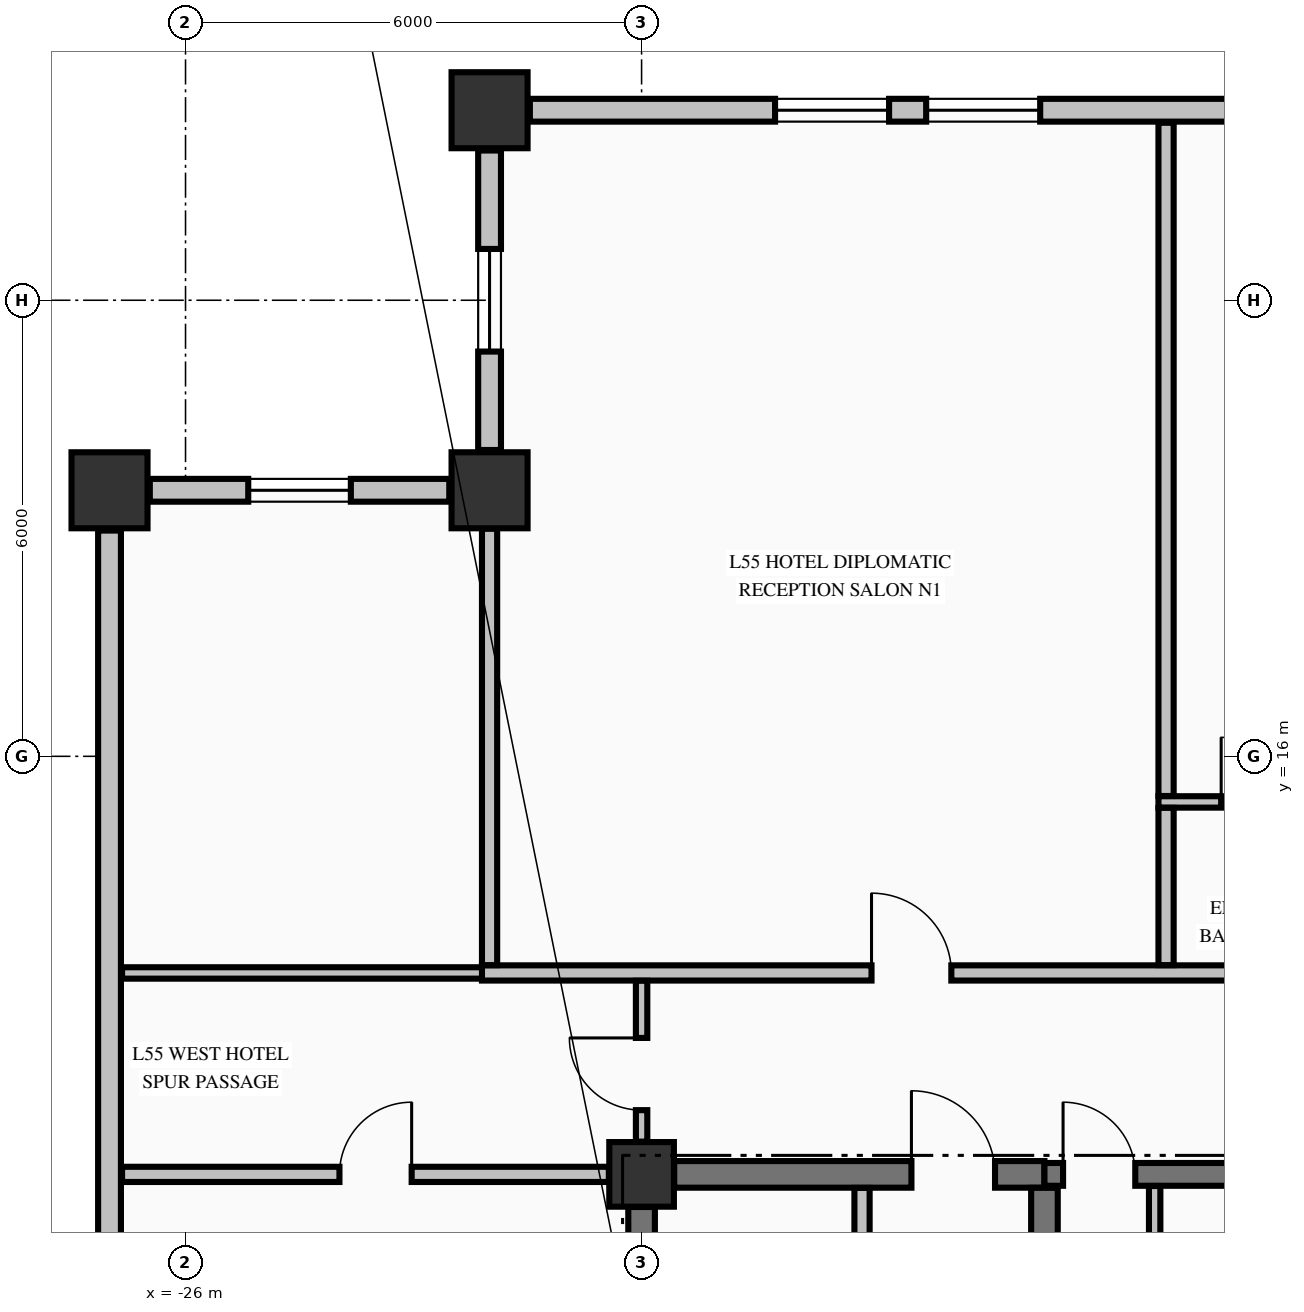
"""IFC4 building model, lengths in metres.
Left out: names, types, materials, properties, quantities, classifications, styles, units other than length and angle.
Written with IfcOpenShell. Run it as: python <this file> out.ifc"""

import sys

from ifc_helpers import new_model, si_unit, direction, frame, frame_2d, origin, origin_2d, place, context, subcontext, project, spatial, rectangle, extrude, element, fill, save


model = new_model("IFC4")
c1 = context("Model", 3, precision=1e-05, world=origin(), true_north=direction((0.0, 1.0)))
c2 = subcontext(c1, "Body", "Model", "MODEL_VIEW")
j1 = project(units=[si_unit("LENGTHUNIT", "METRE"), si_unit("PLANEANGLEUNIT", "RADIAN")], contexts=[c1])
p1 = place(None, origin())
s1 = spatial("IfcSite", under=j1, at=p1, CompositionType="ELEMENT")
p2 = place(p1, origin())
s2 = spatial("IfcBuilding", under=s1, at=p2, CompositionType="ELEMENT")
p3 = place(p2, frame((0.0, 0.0, 211.86)))
s3 = spatial("IfcBuildingStorey", under=s2, at=p3, CompositionType="ELEMENT", Elevation=211.86)
for number, where, z_axis, x_axis in (
    (1, (-22.0, 24.5, -0.325), (0.0, 0.0, 1.0), (1.0, 0.0, 0.0)),
    (2, (-27.0, 19.5, -0.325), (0.0, 0.0, 1.0), (1.0, 0.0, 0.0)),
    (3, (-22.0, 19.5, -0.325), (0.0, 0.0, 1.0), (1.0, 0.0, 0.0)),
):
    element("IfcColumn", number, at=place(p3, frame(where, z_axis=z_axis, x_axis=x_axis)), inside=s3, PredefinedType="COLUMN", context=c2, shape_type="SweptSolid", body=[
        extrude(rectangle(XDim=1.0, YDim=1.0, at=origin_2d()), origin(), (0.0, 0.0, 1.0), 3.475),
    ])
p4 = place(p3, frame((-20.0, 10.5, -0.325), z_axis=(0.0, 0.0, 1.0), x_axis=(1.0, 0.0, 0.0)))
e4 = element("IfcColumn", 4, at=p4, inside=s3, PredefinedType="COLUMN", context=c2, shape_type="SweptSolid", body=[
    extrude(rectangle(XDim=0.85, YDim=0.85, at=origin_2d()), origin(), (0.0, 0.0, 1.0), 3.475),
])
p5 = place(p3, frame((-22.0, 23.97, 0.0), z_axis=(0.0, 0.0, 1.0), x_axis=(0.0, -1.0, 0.0)))
e5 = element("IfcWall", 5, at=p5, inside=s3, PredefinedType="STANDARD", context=c2, shape_type="SweptSolid", body=[
    extrude(rectangle(XDim=3.94, YDim=0.3, at=frame_2d((1.97, 0.0))), origin(), (0.0, 0.0, 1.0), 2.542),
])
p6 = place(p5, frame((1.295, 0.0, 0.68)))
e6 = element("IfcOpeningElement", 6, at=p6, cuts=e5, PredefinedType="OPENING", context=c2, shape_type="SweptSolid", body=[
    extrude(rectangle(XDim=1.35, YDim=1.42, at=frame_2d((0.675, 0.71))), frame((0.0, 0.16, 0.0), z_axis=(0.0, -1.0, 0.0), x_axis=(1.0, 0.0, 0.0)), (0.0, 0.0, 1.0), 0.32),
])
p7 = place(p3, frame((-22.53, 19.5, 0.0), z_axis=(0.0, 0.0, 1.0), x_axis=(-1.0, 0.0, 0.0)))
e7 = element("IfcWall", 7, at=p7, inside=s3, PredefinedType="STANDARD", context=c2, shape_type="SweptSolid", body=[
    extrude(rectangle(XDim=3.94, YDim=0.3, at=frame_2d((1.97, 0.0))), origin(), (0.0, 0.0, 1.0), 2.542),
])
p8 = place(p7, frame((1.295, 0.0, 0.68)))
e8 = element("IfcOpeningElement", 8, at=p8, cuts=e7, PredefinedType="OPENING", context=c2, shape_type="SweptSolid", body=[
    extrude(rectangle(XDim=1.35, YDim=1.42, at=frame_2d((0.675, 0.71))), frame((0.0, 0.16, 0.0), z_axis=(0.0, -1.0, 0.0), x_axis=(1.0, 0.0, 0.0)), (0.0, 0.0, 1.0), 0.32),
])
p9 = place(p3, frame((-11.53, 24.5, 0.0), z_axis=(0.0, 0.0, 1.0), x_axis=(-1.0, 0.0, 0.0)))
e9 = element("IfcWall", 9, at=p9, inside=s3, PredefinedType="STANDARD", context=c2, shape_type="SweptSolid", body=[
    extrude(rectangle(XDim=9.94, YDim=0.3, at=frame_2d((4.97, 0.0))), origin(), (0.0, 0.0, 1.0), 2.542),
])
p10 = place(p9, frame((3.226, 0.0, 0.72)))
e10 = element("IfcOpeningElement", 10, at=p10, cuts=e9, PredefinedType="OPENING", context=c2, shape_type="SweptSolid", body=[
    extrude(rectangle(XDim=1.5, YDim=1.6, at=frame_2d((0.75, 0.8))), frame((0.0, 0.16, 0.0), z_axis=(0.0, -1.0, 0.0), x_axis=(1.0, 0.0, 0.0)), (0.0, 0.0, 1.0), 0.32),
])
p11 = place(p9, frame((5.214, 0.0, 0.72)))
e11 = element("IfcOpeningElement", 11, at=p11, cuts=e9, PredefinedType="OPENING", context=c2, shape_type="SweptSolid", body=[
    extrude(rectangle(XDim=1.5, YDim=1.6, at=frame_2d((0.75, 0.8))), frame((0.0, 0.16, 0.0), z_axis=(0.0, -1.0, 0.0), x_axis=(1.0, 0.0, 0.0)), (0.0, 0.0, 1.0), 0.32),
])
p12 = place(p3, frame((-27.0, 18.97, 0.0), z_axis=(0.0, 0.0, 1.0), x_axis=(0.0, -1.0, 0.0)))
e12 = element("IfcWall", 12, at=p12, inside=s3, PredefinedType="STANDARD", context=c2, shape_type="SweptSolid", body=[
    extrude(rectangle(XDim=9.44, YDim=0.3, at=frame_2d((4.72, 0.0))), origin(), (0.0, 0.0, 1.0), 2.542),
])
p13 = place(p3, frame((-19.571, 10.5, 0.0), z_axis=(0.0, 0.0, 1.0), x_axis=(1.0, 0.0, 0.0)))
e13 = element("IfcWall", 13, at=p13, inside=s3, PredefinedType="SHEAR", context=c2, shape_type="SweptSolid", body=[
    extrude(rectangle(XDim=4.871, YDim=0.35, at=frame_2d((2.436, 0.0))), origin(), (0.0, 0.0, 1.0), 3.15),
])
p14 = place(p13, frame((3.121, 0.0, 0.0)))
e14 = element("IfcOpeningElement", 14, at=p14, cuts=e13, PredefinedType="OPENING", context=c2, shape_type="SweptSolid", body=[
    extrude(rectangle(XDim=1.1, YDim=2.15, at=frame_2d((0.55, 1.075))), frame((0.0, 0.185, 0.0), z_axis=(0.0, -1.0, 0.0), x_axis=(1.0, 0.0, 0.0)), (0.0, 0.0, 1.0), 0.37),
])
p15 = place(p3, frame((-14.7, 10.5, 0.0), z_axis=(0.0, 0.0, 1.0), x_axis=(1.0, 0.0, 0.0)))
e15 = element("IfcWall", 15, at=p15, inside=s3, PredefinedType="SHEAR", context=c2, shape_type="SweptSolid", body=[
    extrude(rectangle(XDim=3.271, YDim=0.3, at=frame_2d((1.635, 0.0))), origin(), (0.0, 0.0, 1.0), 3.15),
])
p16 = place(p15, frame((0.245, 0.0, 0.0)))
e16 = element("IfcOpeningElement", 16, at=p16, cuts=e15, PredefinedType="OPENING", context=c2, shape_type="SweptSolid", body=[
    extrude(rectangle(XDim=0.95, YDim=2.15, at=frame_2d((0.475, 1.075))), frame((0.0, 0.16, 0.0), z_axis=(0.0, -1.0, 0.0), x_axis=(1.0, 0.0, 0.0)), (0.0, 0.0, 1.0), 0.32),
])
p17 = place(p3, frame((-26.835, 10.5, 0.0), z_axis=(0.0, 0.0, 1.0), x_axis=(1.0, 0.0, 0.0)))
e17 = element("IfcWall", 17, at=p17, inside=s3, PredefinedType="PARTITIONING", context=c2, shape_type="SweptSolid", body=[
    extrude(rectangle(XDim=6.404, YDim=0.2, at=frame_2d((3.202, 0.0))), origin(), (0.0, 0.0, 1.0), 3.15),
])
p18 = place(p17, frame((2.86, 0.0, 0.0)))
e18 = element("IfcOpeningElement", 18, at=p18, cuts=e17, PredefinedType="OPENING", context=c2, shape_type="SweptSolid", body=[
    extrude(rectangle(XDim=0.95, YDim=2.15, at=frame_2d((0.475, 1.075))), frame((0.0, 0.11, 0.0), z_axis=(0.0, -1.0, 0.0), x_axis=(1.0, 0.0, 0.0)), (0.0, 0.0, 1.0), 0.22),
])
p19 = place(p3, frame((-26.835, 13.15, 0.0), z_axis=(0.0, 0.0, 1.0), x_axis=(1.0, 0.0, 0.0)))
e19 = element("IfcWall", 19, at=p19, inside=s3, PredefinedType="PARTITIONING", context=c2, shape_type="SweptSolid", body=[
    extrude(rectangle(XDim=4.935, YDim=0.15, at=frame_2d((2.468, 0.0))), origin(), (0.0, 0.0, 1.0), 3.15),
])
p20 = place(p3, frame((-22.1, 13.15, 0.0), z_axis=(0.0, 0.0, 1.0), x_axis=(1.0, 0.0, 0.0)))
e20 = element("IfcWall", 20, at=p20, inside=s3, PredefinedType="PARTITIONING", context=c2, shape_type="SweptSolid", body=[
    extrude(rectangle(XDim=39.2, YDim=0.2, at=frame_2d((19.6, 0.0))), origin(), (0.0, 0.0, 1.0), 3.15),
])
p21 = place(p20, frame((5.125, 0.0, 0.0)))
e21 = element("IfcOpeningElement", 21, at=p21, cuts=e20, PredefinedType="OPENING", context=c2, shape_type="SweptSolid", body=[
    extrude(rectangle(XDim=1.05, YDim=2.15, at=frame_2d((0.525, 1.075))), frame((0.0, 0.11, 0.0), z_axis=(0.0, -1.0, 0.0), x_axis=(1.0, 0.0, 0.0)), (0.0, 0.0, 1.0), 0.22),
])
p22 = place(p20, frame((14.125, 0.0, 0.0)))
e22 = element("IfcOpeningElement", 22, at=p22, cuts=e20, PredefinedType="OPENING", context=c2, shape_type="SweptSolid", body=[
    extrude(rectangle(XDim=0.95, YDim=2.15, at=frame_2d((0.475, 1.075))), frame((0.0, 0.11, 0.0), z_axis=(0.0, -1.0, 0.0), x_axis=(1.0, 0.0, 0.0)), (0.0, 0.0, 1.0), 0.22),
])
p23 = place(p20, frame((21.375, 0.0, 0.0)))
e23 = element("IfcOpeningElement", 23, at=p23, cuts=e20, PredefinedType="OPENING", context=c2, shape_type="SweptSolid", body=[
    extrude(rectangle(XDim=0.95, YDim=2.15, at=frame_2d((0.475, 1.075))), frame((0.0, 0.11, 0.0), z_axis=(0.0, -1.0, 0.0), x_axis=(1.0, 0.0, 0.0)), (0.0, 0.0, 1.0), 0.22),
])
p24 = place(p20, frame((30.375, 0.0, 0.0)))
e24 = element("IfcOpeningElement", 24, at=p24, cuts=e20, PredefinedType="OPENING", context=c2, shape_type="SweptSolid", body=[
    extrude(rectangle(XDim=0.95, YDim=2.15, at=frame_2d((0.475, 1.075))), frame((0.0, 0.11, 0.0), z_axis=(0.0, -1.0, 0.0), x_axis=(1.0, 0.0, 0.0)), (0.0, 0.0, 1.0), 0.22),
])
p25 = place(p3, frame((-13.2, 15.4, 0.0), z_axis=(0.0, 0.0, 1.0), x_axis=(1.0, 0.0, 0.0)))
e25 = element("IfcWall", 25, at=p25, inside=s3, PredefinedType="PARTITIONING", context=c2, shape_type="SweptSolid", body=[
    extrude(rectangle(XDim=2.475, YDim=0.15, at=frame_2d((1.237, 0.0))), origin(), (0.0, 0.0, 1.0), 3.15),
])
p26 = place(p25, frame((0.825, 0.0, 0.0)))
e26 = element("IfcOpeningElement", 26, at=p26, cuts=e25, PredefinedType="OPENING", context=c2, shape_type="SweptSolid", body=[
    extrude(rectangle(XDim=0.85, YDim=2.1, at=frame_2d((0.425, 1.05))), frame((0.0, 0.085, 0.0), z_axis=(0.0, -1.0, 0.0), x_axis=(1.0, 0.0, 0.0)), (0.0, 0.0, 1.0), 0.17),
])
p27 = place(p3, frame((-20.0, 5.327, 0.0), z_axis=(0.0, 0.0, 1.0), x_axis=(0.0, 1.0, 0.0)))
e27 = element("IfcWall", 27, at=p27, inside=s3, PredefinedType="SHEAR", context=c2, shape_type="SweptSolid", body=[
    extrude(rectangle(XDim=4.744, YDim=0.35, at=frame_2d((2.372, 0.0))), origin(), (0.0, 0.0, 1.0), 3.15),
])
p28 = place(p3, frame((-14.7, 5.852, 0.0), z_axis=(0.0, 0.0, 1.0), x_axis=(0.0, 1.0, 0.0)))
e28 = element("IfcWall", 28, at=p28, inside=s3, PredefinedType="SHEAR", context=c2, shape_type="SweptSolid", body=[
    extrude(rectangle(XDim=4.471, YDim=0.35, at=frame_2d((2.235, 0.0))), origin(), (0.0, 0.0, 1.0), 3.15),
])
p29 = place(p3, frame((-22.0, 13.253, 0.0), z_axis=(0.0, 0.0, 1.0), x_axis=(0.0, 1.0, 0.0)))
e29 = element("IfcWall", 29, at=p29, inside=s3, PredefinedType="PARTITIONING", context=c2, shape_type="SweptSolid", body=[
    extrude(rectangle(XDim=5.741, YDim=0.2, at=frame_2d((2.871, 0.0))), origin(), (0.0, 0.0, 1.0), 3.15),
])
p30 = place(p3, frame((-20.0, 10.931, 0.0), z_axis=(0.0, 0.0, 1.0), x_axis=(0.0, 1.0, 0.0)))
e30 = element("IfcWall", 30, at=p30, inside=s3, PredefinedType="PARTITIONING", context=c2, shape_type="SweptSolid", body=[
    extrude(rectangle(XDim=2.116, YDim=0.15, at=frame_2d((1.058, 0.0))), origin(), (0.0, 0.0, 1.0), 2.342),
])
p31 = place(p30, frame((0.414, 0.0, 0.0)))
e31 = element("IfcOpeningElement", 31, at=p31, cuts=e30, PredefinedType="OPENING", context=c2, shape_type="SweptSolid", body=[
    extrude(rectangle(XDim=0.95, YDim=2.15, at=frame_2d((0.475, 1.075))), frame((0.0, 0.085, 0.0), z_axis=(0.0, -1.0, 0.0), x_axis=(1.0, 0.0, 0.0)), (0.0, 0.0, 1.0), 0.17),
])
p32 = place(p3, frame((-17.1, 7.928, 0.0), z_axis=(0.0, 0.0, 1.0), x_axis=(0.0, 1.0, 0.0)))
e32 = element("IfcWall", 32, at=p32, inside=s3, PredefinedType="PARTITIONING", context=c2, shape_type="SweptSolid", body=[
    extrude(rectangle(XDim=2.394, YDim=0.2, at=frame_2d((1.197, 0.0))), origin(), (0.0, 0.0, 1.0), 3.15),
])
p33 = place(p32, frame((0.747, 0.0, 0.0)))
e33 = element("IfcOpeningElement", 33, at=p33, cuts=e32, PredefinedType="OPENING", context=c2, shape_type="SweptSolid", body=[
    extrude(rectangle(XDim=0.95, YDim=2.15, at=frame_2d((0.475, 1.075))), frame((0.0, 0.11, 0.0), z_axis=(0.0, -1.0, 0.0), x_axis=(1.0, 0.0, 0.0)), (0.0, 0.0, 1.0), 0.22),
])
p34 = place(p3, frame((-13.25, 5.853, 0.0), z_axis=(0.0, 0.0, 1.0), x_axis=(0.0, 1.0, 0.0)))
e34 = element("IfcWall", 34, at=p34, inside=s3, PredefinedType="PARTITIONING", context=c2, shape_type="SweptSolid", body=[
    extrude(rectangle(XDim=4.494, YDim=0.15, at=frame_2d((2.247, 0.0))), origin(), (0.0, 0.0, 1.0), 3.15),
])
p35 = place(p34, frame((1.472, 0.0, 0.0)))
e35 = element("IfcOpeningElement", 35, at=p35, cuts=e34, PredefinedType="OPENING", context=c2, shape_type="SweptSolid", body=[
    extrude(rectangle(XDim=0.95, YDim=2.15, at=frame_2d((0.475, 1.075))), frame((0.0, 0.085, 0.0), z_axis=(0.0, -1.0, 0.0), x_axis=(1.0, 0.0, 0.0)), (0.0, 0.0, 1.0), 0.17),
])
p36 = place(p3, frame((-13.1, 13.253, 0.0), z_axis=(0.0, 0.0, 1.0), x_axis=(0.0, 1.0, 0.0)))
e36 = element("IfcWall", 36, at=p36, inside=s3, PredefinedType="PARTITIONING", context=c2, shape_type="SweptSolid", body=[
    extrude(rectangle(XDim=2.069, YDim=0.2, at=frame_2d((1.035, 0.0))), origin(), (0.0, 0.0, 1.0), 3.15),
])
p37 = place(p3, frame((-13.1, 15.478, 0.0), z_axis=(0.0, 0.0, 1.0), x_axis=(0.0, 1.0, 0.0)))
e37 = element("IfcWall", 37, at=p37, inside=s3, PredefinedType="PARTITIONING", context=c2, shape_type="SweptSolid", body=[
    extrude(rectangle(XDim=8.857, YDim=0.2, at=frame_2d((4.428, 0.0))), origin(), (0.0, 0.0, 1.0), 3.15),
])
p38 = place(p6, origin())
e38 = element("IfcWindow", 38, at=p38, inside=s3, PartitioningType="SINGLE_PANEL", PredefinedType="WINDOW", context=c2, shape_type="SweptSolid", body=[
    extrude(rectangle(XDim=1.35, YDim=1.42, at=frame_2d((0.675, 0.71))), frame((0.0, 0.03, 0.0), z_axis=(0.0, -1.0, 0.0), x_axis=(1.0, 0.0, 0.0)), (0.0, 0.0, 1.0), 0.06),
])
fill(e6, e38)
p39 = place(p8, origin())
e39 = element("IfcWindow", 39, at=p39, inside=s3, PartitioningType="SINGLE_PANEL", PredefinedType="WINDOW", context=c2, shape_type="SweptSolid", body=[
    extrude(rectangle(XDim=1.35, YDim=1.42, at=frame_2d((0.675, 0.71))), frame((0.0, 0.03, 0.0), z_axis=(0.0, -1.0, 0.0), x_axis=(1.0, 0.0, 0.0)), (0.0, 0.0, 1.0), 0.06),
])
fill(e8, e39)
p40 = place(p10, origin())
e40 = element("IfcWindow", 40, at=p40, inside=s3, PartitioningType="SINGLE_PANEL", PredefinedType="WINDOW", context=c2, shape_type="SweptSolid", body=[
    extrude(rectangle(XDim=1.5, YDim=1.6, at=frame_2d((0.75, 0.8))), frame((0.0, 0.03, 0.0), z_axis=(0.0, -1.0, 0.0), x_axis=(1.0, 0.0, 0.0)), (0.0, 0.0, 1.0), 0.06),
])
fill(e10, e40)
p41 = place(p11, origin())
e41 = element("IfcWindow", 41, at=p41, inside=s3, PartitioningType="SINGLE_PANEL", PredefinedType="WINDOW", context=c2, shape_type="SweptSolid", body=[
    extrude(rectangle(XDim=1.5, YDim=1.6, at=frame_2d((0.75, 0.8))), frame((0.0, 0.03, 0.0), z_axis=(0.0, -1.0, 0.0), x_axis=(1.0, 0.0, 0.0)), (0.0, 0.0, 1.0), 0.06),
])
fill(e11, e41)
p42 = place(p16, origin())
e42 = element("IfcDoor", 42, at=p42, inside=s3, OperationType="SINGLE_SWING_LEFT", PredefinedType="DOOR", context=c2, shape_type="SweptSolid", body=[
    extrude(rectangle(XDim=0.95, YDim=2.15, at=frame_2d((0.475, 1.075))), frame((0.0, 0.025, 0.0), z_axis=(0.0, -1.0, 0.0), x_axis=(1.0, 0.0, 0.0)), (0.0, 0.0, 1.0), 0.05),
])
fill(e16, e42)
p43 = place(p14, origin())
e43 = element("IfcDoor", 43, at=p43, inside=s3, OperationType="SINGLE_SWING_LEFT", PredefinedType="DOOR", context=c2, shape_type="SweptSolid", body=[
    extrude(rectangle(XDim=1.1, YDim=2.15, at=frame_2d((0.55, 1.075))), frame((0.0, 0.025, 0.0), z_axis=(0.0, -1.0, 0.0), x_axis=(1.0, 0.0, 0.0)), (0.0, 0.0, 1.0), 0.05),
])
fill(e14, e43)
p44 = place(p21, origin())
e44 = element("IfcDoor", 44, at=p44, inside=s3, OperationType="SINGLE_SWING_LEFT", PredefinedType="DOOR", context=c2, shape_type="SweptSolid", body=[
    extrude(rectangle(XDim=1.05, YDim=2.15, at=frame_2d((0.525, 1.075))), frame((0.0, 0.025, 0.0), z_axis=(0.0, -1.0, 0.0), x_axis=(1.0, 0.0, 0.0)), (0.0, 0.0, 1.0), 0.05),
])
fill(e21, e44)
p45 = place(p26, origin())
e45 = element("IfcDoor", 45, at=p45, inside=s3, OperationType="SINGLE_SWING_LEFT", PredefinedType="DOOR", context=c2, shape_type="SweptSolid", body=[
    extrude(rectangle(XDim=0.85, YDim=2.1, at=frame_2d((0.425, 1.05))), frame((0.0, 0.025, 0.0), z_axis=(0.0, -1.0, 0.0), x_axis=(1.0, 0.0, 0.0)), (0.0, 0.0, 1.0), 0.05),
])
fill(e26, e45)
p46 = place(p31, origin())
e46 = element("IfcDoor", 46, at=p46, inside=s3, OperationType="SINGLE_SWING_RIGHT", PredefinedType="DOOR", context=c2, shape_type="SweptSolid", body=[
    extrude(rectangle(XDim=0.95, YDim=2.15, at=frame_2d((0.475, 1.075))), frame((0.0, 0.025, 0.0), z_axis=(0.0, -1.0, 0.0), x_axis=(1.0, 0.0, 0.0)), (0.0, 0.0, 1.0), 0.05),
])
fill(e31, e46)
p47 = place(p18, origin())
e47 = element("IfcDoor", 47, at=p47, inside=s3, OperationType="SINGLE_SWING_RIGHT", PredefinedType="DOOR", context=c2, shape_type="SweptSolid", body=[
    extrude(rectangle(XDim=0.95, YDim=2.15, at=frame_2d((0.475, 1.075))), frame((0.0, 0.025, 0.0), z_axis=(0.0, -1.0, 0.0), x_axis=(1.0, 0.0, 0.0)), (0.0, 0.0, 1.0), 0.05),
])
fill(e18, e47)
save(model, sys.argv[1])
